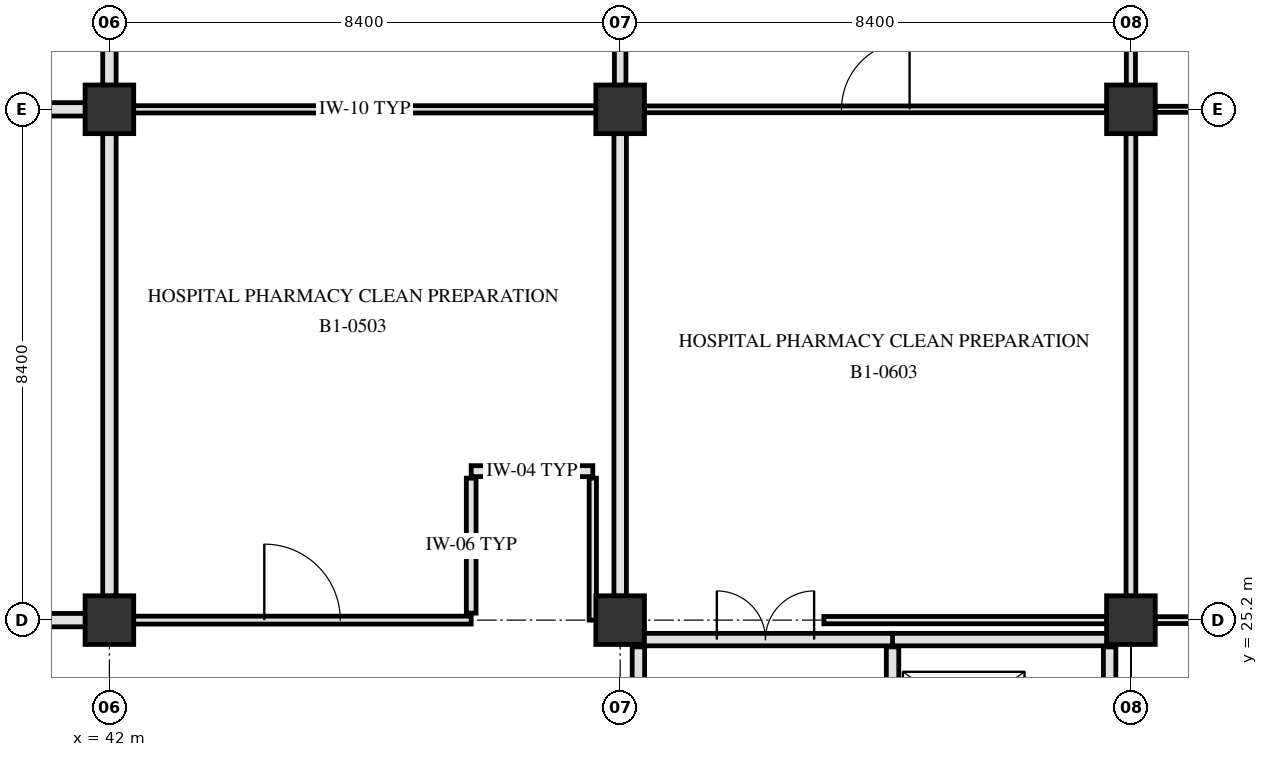
"""IFC4 building model, lengths in metres.
Left out: names, types, materials, properties, quantities, classifications, styles, units other than length and angle.
Written with IfcOpenShell. Run it as: python <this file> out.ifc"""

import sys

from ifc_helpers import new_model, si_unit, direction, frame, frame_2d, origin, origin_2d, place, context, subcontext, project, spatial, rectangle, extrude, element, fill, save


model = new_model("IFC4")
c1 = context("Model", 3, precision=1e-05, world=origin(), true_north=direction((0.0, 1.0)))
c2 = subcontext(c1, "Body", "Model", "MODEL_VIEW")
j1 = project(units=[si_unit("LENGTHUNIT", "METRE"), si_unit("PLANEANGLEUNIT", "RADIAN")], contexts=[c1])
p1 = place(None, origin())
s1 = spatial("IfcSite", under=j1, at=p1, CompositionType="ELEMENT")
p2 = place(p1, origin())
s2 = spatial("IfcBuilding", under=s1, at=p2, CompositionType="ELEMENT")
p3 = place(p2, frame((0.0, 0.0, -5.4)))
s3 = spatial("IfcBuildingStorey", under=s2, at=p3, CompositionType="ELEMENT", Elevation=-5.4)
for number, where, z_axis, x_axis in (
    (1, (42.0, 25.2, 0.0), (0.0, 0.0, 1.0), (1.0, 0.0, 0.0)),
    (2, (42.0, 33.6, 0.0), (0.0, 0.0, 1.0), (1.0, 0.0, 0.0)),
    (3, (50.4, 25.2, 0.0), (0.0, 0.0, 1.0), (1.0, 0.0, 0.0)),
    (4, (50.4, 33.6, 0.0), (0.0, 0.0, 1.0), (1.0, 0.0, 0.0)),
    (5, (58.8, 25.2, 0.0), (0.0, 0.0, 1.0), (1.0, 0.0, 0.0)),
    (6, (58.8, 33.6, 0.0), (0.0, 0.0, 1.0), (1.0, 0.0, 0.0)),
):
    element("IfcColumn", number, at=place(p3, frame(where, z_axis=z_axis, x_axis=x_axis)), inside=s3, PredefinedType="COLUMN", context=c2, shape_type="SweptSolid", body=[
        extrude(rectangle(XDim=0.8, YDim=0.8, at=origin_2d()), origin(), (0.0, 0.0, 1.0), 5.4),
    ])
p4 = place(p3, frame((54.88, 20.64, 0.0), z_axis=(0.0, 0.0, 1.0), x_axis=(0.0, 1.0, 0.0)))
e7 = element("IfcWall", 7, at=p4, inside=s3, PredefinedType="PARTITIONING", context=c2, shape_type="SweptSolid", body=[
    extrude(rectangle(XDim=4.12, YDim=0.205, at=frame_2d((2.06, 0.0))), origin(), (0.0, 0.0, 1.0), 5.07),
])
p5 = place(p4, frame((0.445, 0.0, 0.0)))
e8 = element("IfcOpeningElement", 8, at=p5, cuts=e7, PredefinedType="OPENING", context=c2, shape_type="SweptSolid", body=[
    extrude(rectangle(XDim=1.35, YDim=2.2, at=frame_2d((0.675, 1.1))), frame((0.0, 0.113, 0.0), z_axis=(0.0, -1.0, 0.0), x_axis=(1.0, 0.0, 0.0)), (0.0, 0.0, 1.0), 0.225),
])
p6 = place(p4, frame((2.45, 0.0, 0.0)))
e9 = element("IfcOpeningElement", 9, at=p6, cuts=e7, PredefinedType="OPENING", context=c2, shape_type="SweptSolid", body=[
    extrude(rectangle(XDim=1.1, YDim=2.15, at=frame_2d((0.55, 1.075))), frame((0.0, 0.113, 0.0), z_axis=(0.0, -1.0, 0.0), x_axis=(1.0, 0.0, 0.0)), (0.0, 0.0, 1.0), 0.225),
])
p7 = place(p3, frame((58.45, 20.64, 0.0), z_axis=(0.0, 0.0, 1.0), x_axis=(0.0, 1.0, 0.0)))
e10 = element("IfcWall", 10, at=p7, inside=s3, PredefinedType="PARTITIONING", context=c2, shape_type="SweptSolid", body=[
    extrude(rectangle(XDim=4.12, YDim=0.205, at=frame_2d((2.06, 0.0))), origin(), (0.0, 0.0, 1.0), 5.07),
])
p8 = place(p3, frame((54.88, 24.88, 0.0), z_axis=(0.0, 0.0, 1.0), x_axis=(1.0, 0.0, 0.0)))
e11 = element("IfcWall", 11, at=p8, inside=s3, PredefinedType="PARTITIONING", context=c2, shape_type="SweptSolid", body=[
    extrude(rectangle(XDim=3.57, YDim=0.205, at=frame_2d((1.785, 0.0))), origin(), (0.0, 0.0, 1.0), 4.42),
])
p9 = place(p3, frame((50.7, 20.64, 0.0), z_axis=(0.0, 0.0, 1.0), x_axis=(0.0, 1.0, 0.0)))
e12 = element("IfcWall", 12, at=p9, inside=s3, PredefinedType="PARTITIONING", context=c2, shape_type="SweptSolid", body=[
    extrude(rectangle(XDim=4.12, YDim=0.205, at=frame_2d((2.06, 0.0))), origin(), (0.0, 0.0, 1.0), 4.47),
])
p10 = place(p3, frame((50.7, 24.88, 0.0), z_axis=(0.0, 0.0, 1.0), x_axis=(1.0, 0.0, 0.0)))
e13 = element("IfcWall", 13, at=p10, inside=s3, PredefinedType="PARTITIONING", context=c2, shape_type="SweptSolid", body=[
    extrude(rectangle(XDim=4.18, YDim=0.205, at=frame_2d((2.09, 0.0))), origin(), (0.0, 0.0, 1.0), 4.42),
])
p11 = place(p10, frame((1.29, 0.0, 0.0)))
e14 = element("IfcOpeningElement", 14, at=p11, cuts=e13, PredefinedType="OPENING", context=c2, shape_type="SweptSolid", body=[
    extrude(rectangle(XDim=1.6, YDim=2.25, at=frame_2d((0.8, 1.125))), frame((0.0, 0.113, 0.0), z_axis=(0.0, -1.0, 0.0), x_axis=(1.0, 0.0, 0.0)), (0.0, 0.0, 1.0), 0.225),
])
p12 = place(p3, frame((36.25, 25.2, 0.0), z_axis=(0.0, 0.0, 1.0), x_axis=(1.0, 0.0, 0.0)))
e15 = element("IfcWall", 15, at=p12, inside=s3, PredefinedType="PARTITIONING", context=c2, shape_type="SweptSolid", body=[
    extrude(rectangle(XDim=5.355, YDim=0.22, at=frame_2d((2.677, 0.0))), origin(), (0.0, 0.0, 1.0), 4.42),
])
p13 = place(p12, frame((1.968, 0.0, 0.0)))
e16 = element("IfcOpeningElement", 16, at=p13, cuts=e15, PredefinedType="OPENING", context=c2, shape_type="SweptSolid", body=[
    extrude(rectangle(XDim=1.42, YDim=2.22, at=frame_2d((0.71, 1.11))), frame((0.0, 0.12, 0.0), z_axis=(0.0, -1.0, 0.0), x_axis=(1.0, 0.0, 0.0)), (0.0, 0.0, 1.0), 0.24),
])
p14 = place(p3, frame((42.395, 25.2, 0.0), z_axis=(0.0, 0.0, 1.0), x_axis=(1.0, 0.0, 0.0)))
e17 = element("IfcWall", 17, at=p14, inside=s3, PredefinedType="PARTITIONING", context=c2, shape_type="SweptSolid", body=[
    extrude(rectangle(XDim=5.555, YDim=0.13, at=frame_2d((2.777, 0.0))), origin(), (0.0, 0.0, 1.0), 4.42),
])
p15 = place(p14, frame((2.153, 0.0, 0.0)))
e18 = element("IfcOpeningElement", 18, at=p15, cuts=e17, PredefinedType="OPENING", context=c2, shape_type="SweptSolid", body=[
    extrude(rectangle(XDim=1.25, YDim=2.2, at=frame_2d((0.625, 1.1))), frame((0.0, 0.075, 0.0), z_axis=(0.0, -1.0, 0.0), x_axis=(1.0, 0.0, 0.0)), (0.0, 0.0, 1.0), 0.15),
])
p16 = place(p3, frame((53.75, 25.2, 0.0), z_axis=(0.0, 0.0, 1.0), x_axis=(1.0, 0.0, 0.0)))
e19 = element("IfcWall", 19, at=p16, inside=s3, PredefinedType="PARTITIONING", context=c2, shape_type="SweptSolid", body=[
    extrude(rectangle(XDim=4.655, YDim=0.12, at=frame_2d((2.328, 0.0))), origin(), (0.0, 0.0, 1.0), 4.42),
])
p17 = place(p3, frame((59.195, 25.2, 0.0), z_axis=(0.0, 0.0, 1.0), x_axis=(1.0, 0.0, 0.0)))
e20 = element("IfcWall", 20, at=p17, inside=s3, PredefinedType="PARTITIONING", context=c2, shape_type="SweptSolid", body=[
    extrude(rectangle(XDim=7.61, YDim=0.112, at=frame_2d((3.805, 0.0))), origin(), (0.0, 0.0, 1.0), 4.42),
])
p18 = place(p17, frame((3.305, 0.0, 0.0)))
e21 = element("IfcOpeningElement", 21, at=p18, cuts=e20, PredefinedType="OPENING", context=c2, shape_type="SweptSolid", body=[
    extrude(rectangle(XDim=1.0, YDim=2.15, at=frame_2d((0.5, 1.075))), frame((0.0, 0.066, 0.0), z_axis=(0.0, -1.0, 0.0), x_axis=(1.0, 0.0, 0.0)), (0.0, 0.0, 1.0), 0.132),
])
p19 = place(p3, frame((47.95, 27.65, 0.0), z_axis=(0.0, 0.0, 1.0), x_axis=(1.0, 0.0, 0.0)))
e22 = element("IfcWall", 22, at=p19, inside=s3, PredefinedType="PARTITIONING", context=c2, shape_type="SweptSolid", body=[
    extrude(rectangle(XDim=2.0, YDim=0.18, at=frame_2d((1.0, 0.0))), origin(), (0.0, 0.0, 1.0), 5.07),
])
p20 = place(p3, frame((36.25, 33.6, 0.0), z_axis=(0.0, 0.0, 1.0), x_axis=(1.0, 0.0, 0.0)))
e23 = element("IfcWall", 23, at=p20, inside=s3, PredefinedType="PARTITIONING", context=c2, shape_type="SweptSolid", body=[
    extrude(rectangle(XDim=5.355, YDim=0.22, at=frame_2d((2.677, 0.0))), origin(), (0.0, 0.0, 1.0), 4.42),
])
p21 = place(p3, frame((42.395, 33.6, 0.0), z_axis=(0.0, 0.0, 1.0), x_axis=(1.0, 0.0, 0.0)))
e24 = element("IfcWall", 24, at=p21, inside=s3, PredefinedType="PARTITIONING", context=c2, shape_type="SweptSolid", body=[
    extrude(rectangle(XDim=7.61, YDim=0.12, at=frame_2d((3.805, 0.0))), origin(), (0.0, 0.0, 1.0), 4.42),
])
p22 = place(p3, frame((50.795, 33.6, 0.0), z_axis=(0.0, 0.0, 1.0), x_axis=(1.0, 0.0, 0.0)))
e25 = element("IfcWall", 25, at=p22, inside=s3, PredefinedType="PARTITIONING", context=c2, shape_type="SweptSolid", body=[
    extrude(rectangle(XDim=7.61, YDim=0.112, at=frame_2d((3.805, 0.0))), origin(), (0.0, 0.0, 1.0), 4.42),
])
p23 = place(p22, frame((3.245, 0.0, 0.0)))
e26 = element("IfcOpeningElement", 26, at=p23, cuts=e25, PredefinedType="OPENING", context=c2, shape_type="SweptSolid", body=[
    extrude(rectangle(XDim=1.12, YDim=2.18, at=frame_2d((0.56, 1.09))), frame((0.0, 0.066, 0.0), z_axis=(0.0, -1.0, 0.0), x_axis=(1.0, 0.0, 0.0)), (0.0, 0.0, 1.0), 0.132),
])
p24 = place(p3, frame((59.195, 33.6, 0.0), z_axis=(0.0, 0.0, 1.0), x_axis=(1.0, 0.0, 0.0)))
e27 = element("IfcWall", 27, at=p24, inside=s3, PredefinedType="PARTITIONING", context=c2, shape_type="SweptSolid", body=[
    extrude(rectangle(XDim=7.61, YDim=0.1, at=frame_2d((3.805, 0.0))), origin(), (0.0, 0.0, 1.0), 4.42),
])
p25 = place(p3, frame((42.0, 25.595, 0.0), z_axis=(0.0, 0.0, 1.0), x_axis=(0.0, 1.0, 0.0)))
e28 = element("IfcWall", 28, at=p25, inside=s3, PredefinedType="PARTITIONING", context=c2, shape_type="SweptSolid", body=[
    extrude(rectangle(XDim=7.61, YDim=0.22, at=frame_2d((3.805, 0.0))), origin(), (0.0, 0.0, 1.0), 4.47),
])
p26 = place(p3, frame((42.0, 33.995, 0.0), z_axis=(0.0, 0.0, 1.0), x_axis=(0.0, 1.0, 0.0)))
e29 = element("IfcWall", 29, at=p26, inside=s3, PredefinedType="PARTITIONING", context=c2, shape_type="SweptSolid", body=[
    extrude(rectangle(XDim=7.61, YDim=0.22, at=frame_2d((3.805, 0.0))), origin(), (0.0, 0.0, 1.0), 4.47),
])
p27 = place(p3, frame((47.95, 25.315, 0.0), z_axis=(0.0, 0.0, 1.0), x_axis=(0.0, 1.0, 0.0)))
e30 = element("IfcWall", 30, at=p27, inside=s3, PredefinedType="PARTITIONING", context=c2, shape_type="SweptSolid", body=[
    extrude(rectangle(XDim=2.22, YDim=0.16, at=frame_2d((1.11, 0.0))), origin(), (0.0, 0.0, 1.0), 4.42),
])
p28 = place(p3, frame((49.95, 25.2, 0.0), z_axis=(0.0, 0.0, 1.0), x_axis=(0.0, 1.0, 0.0)))
e31 = element("IfcWall", 31, at=p28, inside=s3, PredefinedType="PARTITIONING", context=c2, shape_type="SweptSolid", body=[
    extrude(rectangle(XDim=2.335, YDim=0.12, at=frame_2d((1.167, 0.0))), origin(), (0.0, 0.0, 1.0), 4.42),
])
p29 = place(p3, frame((50.4, 25.595, 0.0), z_axis=(0.0, 0.0, 1.0), x_axis=(0.0, 1.0, 0.0)))
e32 = element("IfcWall", 32, at=p29, inside=s3, PredefinedType="PARTITIONING", context=c2, shape_type="SweptSolid", body=[
    extrude(rectangle(XDim=7.61, YDim=0.205, at=frame_2d((3.805, 0.0))), origin(), (0.0, 0.0, 1.0), 4.47),
])
p30 = place(p3, frame((50.4, 33.995, 0.0), z_axis=(0.0, 0.0, 1.0), x_axis=(0.0, 1.0, 0.0)))
e33 = element("IfcWall", 33, at=p30, inside=s3, PredefinedType="PARTITIONING", context=c2, shape_type="SweptSolid", body=[
    extrude(rectangle(XDim=7.61, YDim=0.19, at=frame_2d((3.805, 0.0))), origin(), (0.0, 0.0, 1.0), 4.47),
])
p31 = place(p3, frame((58.8, 25.595, 0.0), z_axis=(0.0, 0.0, 1.0), x_axis=(0.0, 1.0, 0.0)))
e34 = element("IfcWall", 34, at=p31, inside=s3, PredefinedType="PARTITIONING", context=c2, shape_type="SweptSolid", body=[
    extrude(rectangle(XDim=7.61, YDim=0.16, at=frame_2d((3.805, 0.0))), origin(), (0.0, 0.0, 1.0), 4.47),
])
p32 = place(p3, frame((58.8, 33.995, 0.0), z_axis=(0.0, 0.0, 1.0), x_axis=(0.0, 1.0, 0.0)))
e35 = element("IfcWall", 35, at=p32, inside=s3, PredefinedType="PARTITIONING", context=c2, shape_type="SweptSolid", body=[
    extrude(rectangle(XDim=7.61, YDim=0.15, at=frame_2d((3.805, 0.0))), origin(), (0.0, 0.0, 1.0), 4.47),
])
p33 = place(p11, origin())
e36 = element("IfcDoor", 36, at=p33, inside=s3, OperationType="DOUBLE_SWING_LEFT", PredefinedType="DOOR", context=c2, shape_type="SweptSolid", body=[
    extrude(rectangle(XDim=1.6, YDim=2.25, at=frame_2d((0.8, 1.125))), frame((0.0, 0.025, 0.0), z_axis=(0.0, -1.0, 0.0), x_axis=(1.0, 0.0, 0.0)), (0.0, 0.0, 1.0), 0.05),
])
fill(e14, e36)
p34 = place(p15, origin())
e37 = element("IfcDoor", 37, at=p34, inside=s3, OperationType="SINGLE_SWING_LEFT", PredefinedType="DOOR", context=c2, shape_type="SweptSolid", body=[
    extrude(rectangle(XDim=1.25, YDim=2.2, at=frame_2d((0.625, 1.1))), frame((0.0, 0.025, 0.0), z_axis=(0.0, -1.0, 0.0), x_axis=(1.0, 0.0, 0.0)), (0.0, 0.0, 1.0), 0.05),
])
fill(e18, e37)
p35 = place(p23, origin())
e38 = element("IfcDoor", 38, at=p35, inside=s3, OperationType="SINGLE_SWING_RIGHT", PredefinedType="DOOR", context=c2, shape_type="SweptSolid", body=[
    extrude(rectangle(XDim=1.12, YDim=2.18, at=frame_2d((0.56, 1.09))), frame((0.0, 0.025, 0.0), z_axis=(0.0, -1.0, 0.0), x_axis=(1.0, 0.0, 0.0)), (0.0, 0.0, 1.0), 0.05),
])
fill(e26, e38)
save(model, sys.argv[1])
